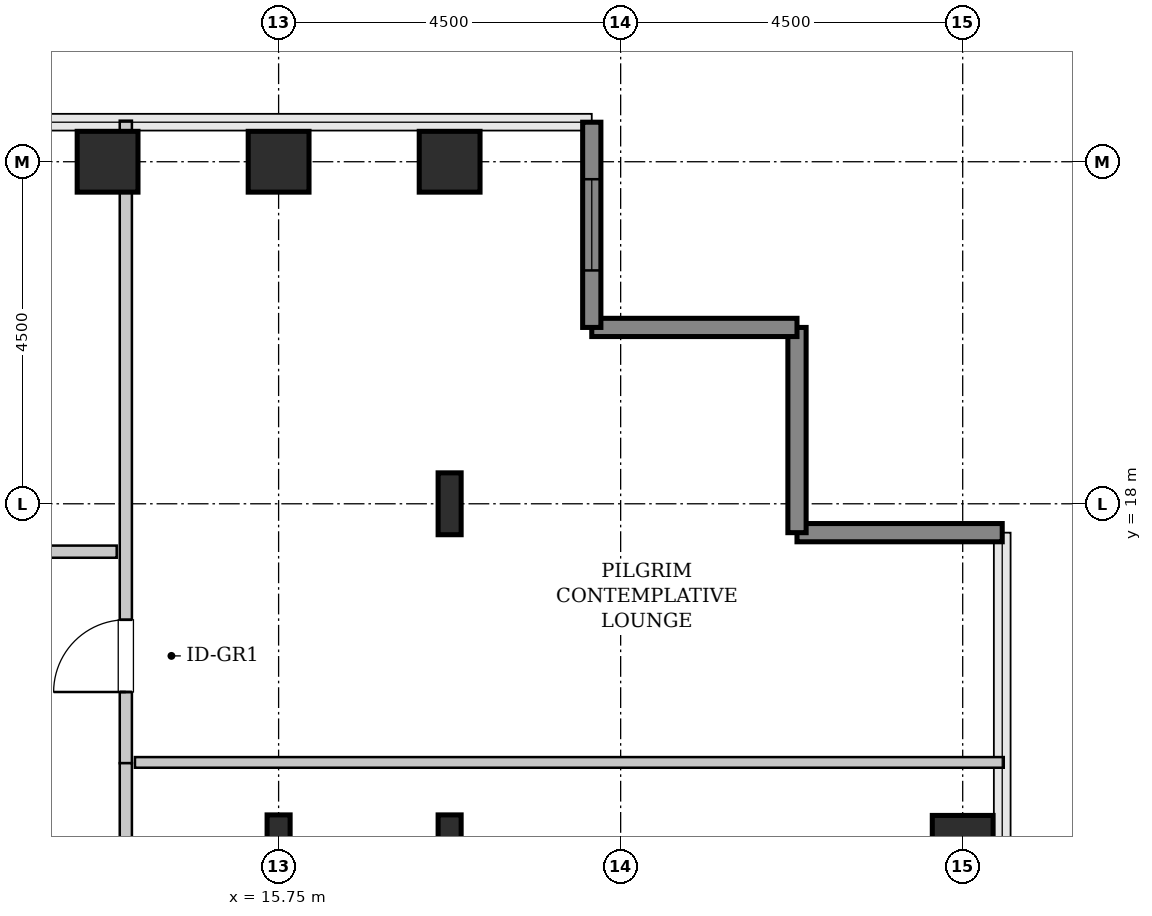
"""IFC4 building model, lengths in metres.
Left out: names, types, materials, properties, quantities, classifications, styles, units other than length and angle.
Written with IfcOpenShell. Run it as: python <this file> out.ifc"""

import sys

from ifc_helpers import new_model, si_unit, direction, frame, frame_2d, origin, origin_2d, place, context, subcontext, project, spatial, rectangle, hollow_rectangle, i_section, extrude, source, transform, mapped, element, fill, save


model = new_model("IFC4")
c1 = context("Model", 3, precision=1e-05, world=origin(), true_north=direction((0.0, 1.0)))
c2 = subcontext(c1, "Body", "Model", "MODEL_VIEW")
j1 = project(units=[si_unit("LENGTHUNIT", "METRE"), si_unit("PLANEANGLEUNIT", "RADIAN")], contexts=[c1])
p1 = place(None, origin())
s1 = spatial("IfcSite", under=j1, at=p1, CompositionType="ELEMENT")
p2 = place(p1, origin())
s2 = spatial("IfcBuilding", under=s1, at=p2, CompositionType="ELEMENT")
p3 = place(p2, frame((0.0, 0.0, 167.8)))
s3 = spatial("IfcBuildingStorey", under=s2, at=p3, CompositionType="ELEMENT", Elevation=167.8)
m1 = source(origin(), c2, "Body", "SweptSolid", [
    extrude(hollow_rectangle(XDim=0.8, YDim=0.8, WallThickness=0.04, InnerFilletRadius=0.04, OuterFilletRadius=0.08, at=origin_2d()), origin(), (0.0, 0.0, 1.0), 3.8),
])
p4 = place(p3, frame((13.5, 22.5, 0.0), z_axis=(0.0, 0.0, 1.0), x_axis=(1.0, 0.0, 0.0)))
e1 = element("IfcColumn", 1, at=p4, inside=s3, PredefinedType="COLUMN", context=c2, shape_type="MappedRepresentation", body=[
    mapped(m1, transform((0.0, 0.0, 0.0), x_axis=(1.0, 0.0, 0.0), y_axis=(0.0, 1.0, 0.0), z_axis=(0.0, 0.0, 1.0), scale=1.0)),
])
m2 = source(origin(), c2, "Body", "SweptSolid", [
    extrude(i_section(OverallWidth=0.303, OverallDepth=0.814, WebThickness=0.021, FlangeThickness=0.04, FilletRadius=0.03, at=origin_2d()), origin(), (0.0, 0.0, 1.0), 3.8),
])
p5 = place(p3, frame((15.75, 13.5, 0.0), z_axis=(0.0, 0.0, 1.0), x_axis=(1.0, 0.0, 0.0)))
e2 = element("IfcColumn", 2, at=p5, inside=s3, PredefinedType="COLUMN", context=c2, shape_type="MappedRepresentation", body=[
    mapped(m2, transform((0.0, 0.0, 0.0), x_axis=(1.0, 0.0, 0.0), y_axis=(0.0, 1.0, 0.0), z_axis=(0.0, 0.0, 1.0), scale=1.0)),
])
p6 = place(p3, frame((15.75, 22.5, 0.0), z_axis=(0.0, 0.0, 1.0), x_axis=(1.0, 0.0, 0.0)))
e3 = element("IfcColumn", 3, at=p6, inside=s3, PredefinedType="COLUMN", context=c2, shape_type="MappedRepresentation", body=[
    mapped(m1, transform((0.0, 0.0, 0.0), x_axis=(1.0, 0.0, 0.0), y_axis=(0.0, 1.0, 0.0), z_axis=(0.0, 0.0, 1.0), scale=1.0)),
])
for number, where, z_axis, x_axis in (
    (4, (18.0, 13.5, 0.0), (0.0, 0.0, 1.0), (1.0, 0.0, 0.0)),
    (5, (18.0, 18.0, 0.0), (0.0, 0.0, 1.0), (1.0, 0.0, 0.0)),
):
    element("IfcColumn", number, at=place(p3, frame(where, z_axis=z_axis, x_axis=x_axis)), inside=s3, PredefinedType="COLUMN", context=c2, shape_type="MappedRepresentation", body=[
        mapped(m2, transform((0.0, 0.0, 0.0), x_axis=(1.0, 0.0, 0.0), y_axis=(0.0, 1.0, 0.0), z_axis=(0.0, 0.0, 1.0), scale=1.0)),
    ])
for number, where, z_axis, x_axis in (
    (6, (18.0, 22.5, 0.0), (0.0, 0.0, 1.0), (1.0, 0.0, 0.0)),
    (7, (24.75, 13.5, 0.0), (0.0, 0.0, 1.0), (1.0, 0.0, 0.0)),
):
    element("IfcColumn", number, at=place(p3, frame(where, z_axis=z_axis, x_axis=x_axis)), inside=s3, PredefinedType="COLUMN", context=c2, shape_type="MappedRepresentation", body=[
        mapped(m1, transform((0.0, 0.0, 0.0), x_axis=(1.0, 0.0, 0.0), y_axis=(0.0, 1.0, 0.0), z_axis=(0.0, 0.0, 1.0), scale=1.0)),
    ])
m3 = source(origin(), c2, "Body", "SweptSolid", [
    extrude(rectangle(XDim=2.7, YDim=0.24, at=frame_2d((1.35, 0.0))), origin(), (0.0, 0.0, 1.0), 3.55),
])
for number, where, z_axis, x_axis in (
    (8, (25.27, 17.62, 0.0), (0.0, 0.0, 1.0), (-1.0, 0.0, 0.0)),
    (9, (22.57, 17.62, 0.0), (0.0, 0.0, 1.0), (0.0, 1.0, 0.0)),
    (10, (22.57, 20.32, 0.0), (0.0, 0.0, 1.0), (-1.0, 0.0, 0.0)),
):
    element("IfcWall", number, at=place(p3, frame(where, z_axis=z_axis, x_axis=x_axis)), inside=s3, PredefinedType="SHEAR", context=c2, shape_type="MappedRepresentation", body=[
        mapped(m3, transform((0.0, 0.0, 0.0), x_axis=(1.0, 0.0, 0.0), y_axis=(0.0, 1.0, 0.0), z_axis=(0.0, 0.0, 1.0), scale=1.0)),
    ])
p7 = place(p3, frame((19.87, 20.32, 0.0), z_axis=(0.0, 0.0, 1.0), x_axis=(0.0, 1.0, 0.0)))
e11 = element("IfcWall", 11, at=p7, inside=s3, PredefinedType="SHEAR", context=c2, shape_type="MappedRepresentation", body=[
    mapped(m3, transform((0.0, 0.0, 0.0), x_axis=(1.0, 0.0, 0.0), y_axis=(0.0, 1.0, 0.0), z_axis=(0.0, 0.0, 1.0), scale=1.0)),
])
p8 = place(p7, frame((0.75, 0.0, 0.85)))
e12 = element("IfcOpeningElement", 12, at=p8, cuts=e11, PredefinedType="OPENING", context=c2, shape_type="SweptSolid", body=[
    extrude(rectangle(XDim=1.2, YDim=1.8, at=frame_2d((0.6, 0.9))), frame((0.0, 0.13, 0.0), z_axis=(0.0, -1.0, 0.0), x_axis=(1.0, 0.0, 0.0)), (0.0, 0.0, 1.0), 0.26),
])
m4 = source(origin(), c2, "Body", "SweptSolid", [
    extrude(rectangle(XDim=8.453, YDim=0.16, at=frame_2d((4.226, 0.0))), origin(), (0.0, 0.0, 1.0), 3.535),
])
p9 = place(p3, frame((13.74, 14.587, 0.0), z_axis=(0.0, 0.0, 1.0), x_axis=(0.0, 1.0, 0.0)))
e13 = element("IfcWall", 13, at=p9, inside=s3, PredefinedType="PARTITIONING", context=c2, shape_type="MappedRepresentation", body=[
    mapped(m4, transform((0.0, 0.0, 0.0), x_axis=(1.0, 0.0, 0.0), y_axis=(0.0, 1.0, 0.0), z_axis=(0.0, 0.0, 1.0), scale=1.0)),
])
p10 = place(p9, frame((0.936, 0.0, 0.0)))
e14 = element("IfcOpeningElement", 14, at=p10, cuts=e13, PredefinedType="OPENING", context=c2, shape_type="SweptSolid", body=[
    extrude(rectangle(XDim=0.95, YDim=2.1, at=frame_2d((0.475, 1.05))), frame((0.0, 0.09, 0.0), z_axis=(0.0, -1.0, 0.0), x_axis=(1.0, 0.0, 0.0)), (0.0, 0.0, 1.0), 0.18),
])
m5 = source(origin(), c2, "Body", "SweptSolid", [
    extrude(rectangle(XDim=11.43, YDim=0.14, at=frame_2d((5.715, 0.0))), origin(), (0.0, 0.0, 1.0), 3.535),
])
p11 = place(p3, frame((13.86, 14.597, 0.0), z_axis=(0.0, 0.0, 1.0), x_axis=(1.0, 0.0, 0.0)))
e15 = element("IfcWall", 15, at=p11, inside=s3, PredefinedType="PARTITIONING", context=c2, shape_type="MappedRepresentation", body=[
    mapped(m5, transform((0.0, 0.0, 0.0), x_axis=(1.0, 0.0, 0.0), y_axis=(0.0, 1.0, 0.0), z_axis=(0.0, 0.0, 1.0), scale=1.0)),
])
m6 = source(origin(), c2, "Body", "SweptSolid", [
    extrude(rectangle(XDim=8.392, YDim=0.16, at=frame_2d((4.196, 0.0))), origin(), (0.0, 0.0, 1.0), 3.535),
])
p12 = place(p3, frame((13.74, 6.195, 0.0), z_axis=(0.0, 0.0, 1.0), x_axis=(0.0, 1.0, 0.0)))
e16 = element("IfcWall", 16, at=p12, inside=s3, PredefinedType="PARTITIONING", context=c2, shape_type="MappedRepresentation", body=[
    mapped(m6, transform((0.0, 0.0, 0.0), x_axis=(1.0, 0.0, 0.0), y_axis=(0.0, 1.0, 0.0), z_axis=(0.0, 0.0, 1.0), scale=1.0)),
])
p13 = place(p12, frame((3.721, 0.0, 0.0)))
e17 = element("IfcOpeningElement", 17, at=p13, cuts=e16, PredefinedType="OPENING", context=c2, shape_type="SweptSolid", body=[
    extrude(rectangle(XDim=0.95, YDim=2.1, at=frame_2d((0.475, 1.05))), frame((0.0, 0.09, 0.0), z_axis=(0.0, -1.0, 0.0), x_axis=(1.0, 0.0, 0.0)), (0.0, 0.0, 1.0), 0.18),
])
m7 = source(origin(), c2, "Body", "SweptSolid", [
    extrude(rectangle(XDim=6.825, YDim=0.16, at=frame_2d((3.413, 0.0))), origin(), (0.0, 0.0, 1.0), 3.535),
])
p14 = place(p3, frame((6.795, 17.37, 0.0), z_axis=(0.0, 0.0, 1.0), x_axis=(1.0, 0.0, 0.0)))
e18 = element("IfcWall", 18, at=p14, inside=s3, PredefinedType="PARTITIONING", context=c2, shape_type="MappedRepresentation", body=[
    mapped(m7, transform((0.0, 0.0, 0.0), x_axis=(1.0, 0.0, 0.0), y_axis=(0.0, 1.0, 0.0), z_axis=(0.0, 0.0, 1.0), scale=1.0)),
])
p15 = place(p14, frame((2.938, 0.0, 0.0)))
e19 = element("IfcOpeningElement", 19, at=p15, cuts=e18, PredefinedType="OPENING", context=c2, shape_type="SweptSolid", body=[
    extrude(rectangle(XDim=0.95, YDim=2.1, at=frame_2d((0.475, 1.05))), frame((0.0, 0.09, 0.0), z_axis=(0.0, -1.0, 0.0), x_axis=(1.0, 0.0, 0.0)), (0.0, 0.0, 1.0), 0.18),
])
m8 = source(origin(), c2, "Body", "SweptSolid", [
    extrude(rectangle(XDim=1.2, YDim=1.8, at=frame_2d((0.6, 0.9))), frame((0.0, 0.03, 0.0), z_axis=(0.0, -1.0, 0.0), x_axis=(1.0, 0.0, 0.0)), (0.0, 0.0, 1.0), 0.06),
])
p16 = place(p8, origin())
e20 = element("IfcWindow", 20, at=p16, inside=s3, PartitioningType="SINGLE_PANEL", PredefinedType="WINDOW", context=c2, shape_type="MappedRepresentation", body=[
    mapped(m8, transform((0.0, 0.0, 0.0), x_axis=(1.0, 0.0, 0.0), y_axis=(0.0, 1.0, 0.0), z_axis=(0.0, 0.0, 1.0), scale=1.0)),
])
fill(e12, e20)
m9 = source(origin(), c2, "Body", "SweptSolid", [
    extrude(rectangle(XDim=0.95, YDim=2.1, at=frame_2d((0.475, 1.05))), frame((0.0, 0.025, 0.0), z_axis=(0.0, -1.0, 0.0), x_axis=(1.0, 0.0, 0.0)), (0.0, 0.0, 1.0), 0.05),
])
p17 = place(p10, origin())
e21 = element("IfcDoor", 21, at=p17, inside=s3, OperationType="SINGLE_SWING_LEFT", PredefinedType="DOOR", context=c2, shape_type="MappedRepresentation", body=[
    mapped(m9, transform((0.0, 0.0, 0.0), x_axis=(1.0, 0.0, 0.0), y_axis=(0.0, 1.0, 0.0), z_axis=(0.0, 0.0, 1.0), scale=1.0)),
])
fill(e14, e21)
save(model, sys.argv[1])
